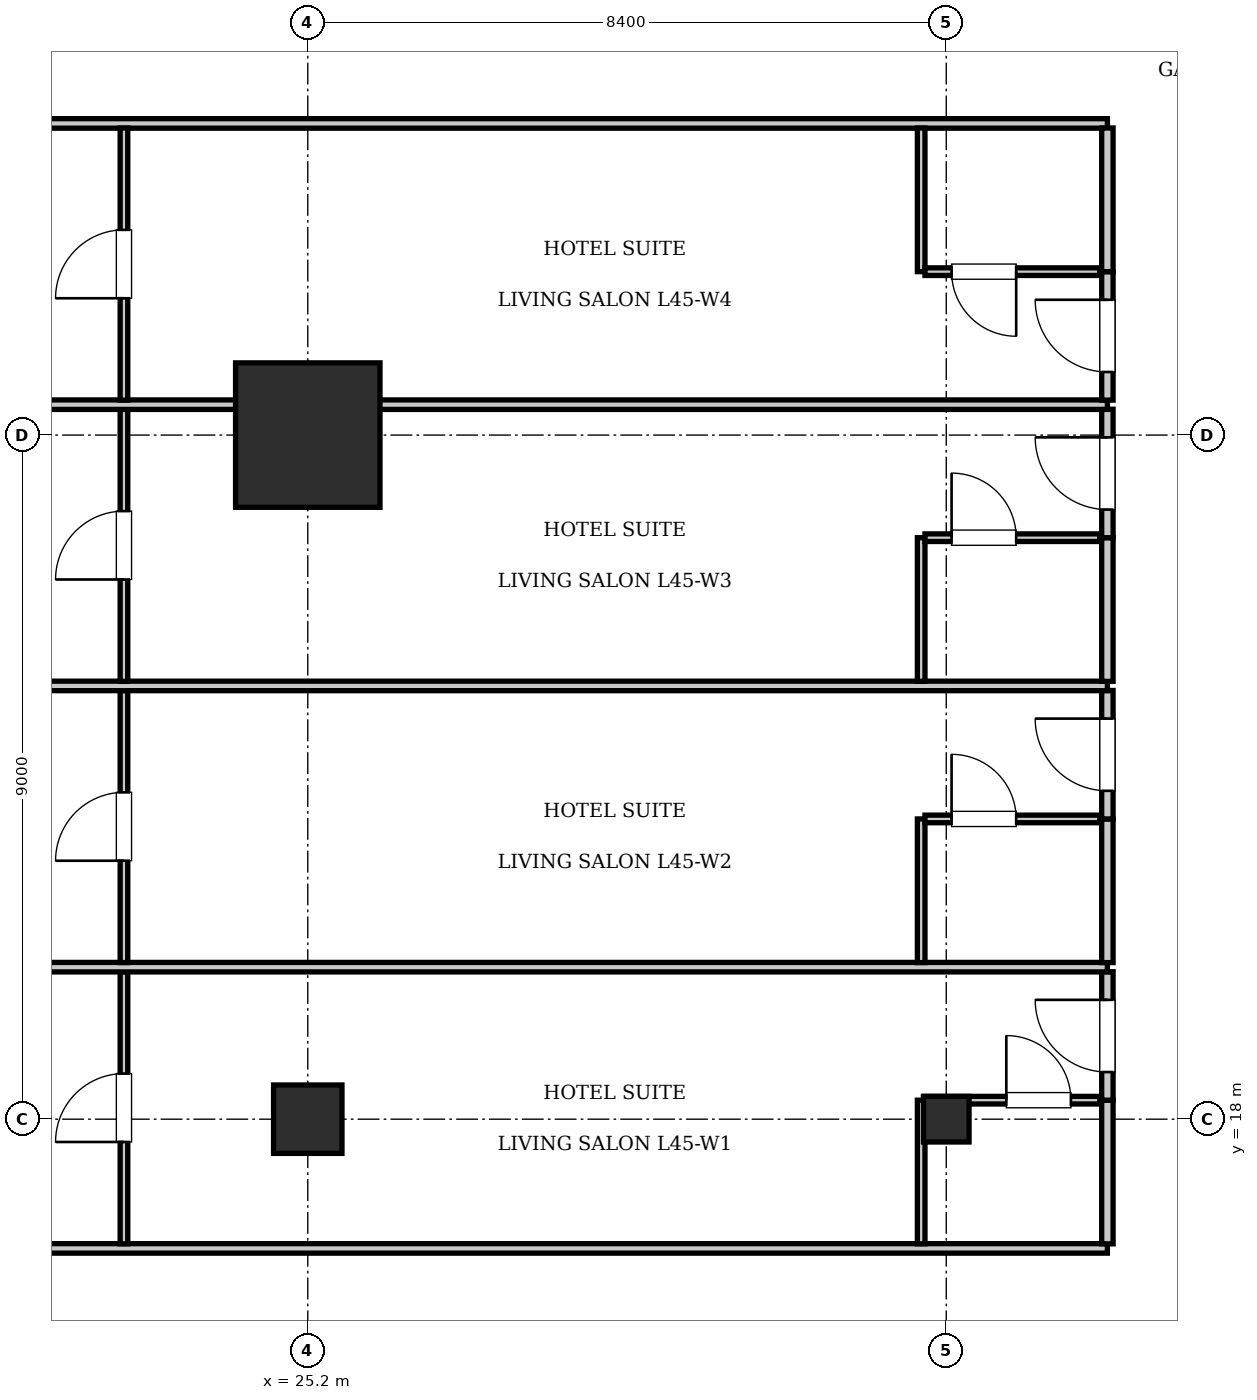
"""IFC4 building model, lengths in metres.
Left out: names, types, materials, properties, quantities, classifications, styles, units other than length and angle.
Written with IfcOpenShell. Run it as: python <this file> out.ifc"""

import sys

from ifc_helpers import new_model, si_unit, direction, frame, frame_2d, origin, origin_2d, place, context, subcontext, project, spatial, rectangle, i_section, extrude, element, fill, save


model = new_model("IFC4")
c1 = context("Model", 3, precision=1e-05, world=origin(), true_north=direction((0.0, 1.0)))
c2 = subcontext(c1, "Body", "Model", "MODEL_VIEW")
j1 = project(units=[si_unit("LENGTHUNIT", "METRE"), si_unit("PLANEANGLEUNIT", "RADIAN")], contexts=[c1])
p1 = place(None, origin())
s1 = spatial("IfcSite", under=j1, at=p1, CompositionType="ELEMENT")
p2 = place(p1, origin())
s2 = spatial("IfcBuilding", under=s1, at=p2, CompositionType="ELEMENT")
p3 = place(p2, frame((0.0, 0.0, 185.15)))
s3 = spatial("IfcBuildingStorey", under=s2, at=p3, CompositionType="ELEMENT", Elevation=185.15)
p4 = place(p3, frame((25.2, 27.0, 0.0), z_axis=(0.0, 0.0, 1.0), x_axis=(1.0, 0.0, 0.0)))
e1 = element("IfcColumn", 1, at=p4, inside=s3, PredefinedType="COLUMN", context=c2, shape_type="SweptSolid", body=[
    extrude(rectangle(XDim=1.9, YDim=1.9, at=origin_2d()), origin(), (0.0, 0.0, 1.0), 3.85),
])
p5 = place(p3, frame((25.2, 18.0, 0.0), z_axis=(0.0, 0.0, 1.0), x_axis=(1.0, 0.0, 0.0)))
e2 = element("IfcColumn", 2, at=p5, inside=s3, PredefinedType="COLUMN", context=c2, shape_type="SweptSolid", body=[
    extrude(rectangle(XDim=0.9, YDim=0.9, at=origin_2d()), origin(), (0.0, 0.0, 1.0), 3.85),
])
p6 = place(p3, frame((33.6, 18.0, 0.0), z_axis=(0.0, 0.0, 1.0), x_axis=(1.0, 0.0, 0.0)))
e3 = element("IfcColumn", 3, at=p6, inside=s3, PredefinedType="COLUMN", context=c2, shape_type="SweptSolid", body=[
    extrude(i_section(OverallWidth=0.6, OverallDepth=0.6, WebThickness=0.025, FlangeThickness=0.038, at=origin_2d()), origin(), (0.0, 0.0, 1.0), 3.85),
])
for number, where, z_axis, x_axis in (
    (4, (13.2, 16.3, 0.0), (0.0, 0.0, 1.0), (1.0, 0.0, 0.0)),
    (5, (13.2, 31.1, 0.0), (0.0, 0.0, 1.0), (1.0, 0.0, 0.0)),
):
    element("IfcWall", number, at=place(p3, frame(where, z_axis=z_axis, x_axis=x_axis)), inside=s3, PredefinedType="PARTITIONING", context=c2, shape_type="SweptSolid", body=[
        extrude(rectangle(XDim=22.52, YDim=0.125, at=frame_2d((11.26, 0.0))), origin(), (0.0, 0.0, 1.0), 3.61),
    ])
p7 = place(p3, frame((35.72, 16.36, 0.0), z_axis=(0.0, 0.0, 1.0), x_axis=(0.0, 1.0, 0.0)))
e6 = element("IfcWall", 6, at=p7, inside=s3, PredefinedType="PARTITIONING", context=c2, shape_type="SweptSolid", body=[
    extrude(rectangle(XDim=1.89, YDim=0.15, at=frame_2d((0.945, 0.0))), origin(), (0.0, 0.0, 1.0), 3.61),
])
p8 = place(p3, frame((35.72, 18.25, 0.0), z_axis=(0.0, 0.0, 1.0), x_axis=(0.0, 1.0, 0.0)))
e7 = element("IfcWall", 7, at=p8, inside=s3, PredefinedType="PARTITIONING", context=c2, shape_type="SweptSolid", body=[
    extrude(rectangle(XDim=1.69, YDim=0.15, at=frame_2d((0.845, 0.0))), origin(), (0.0, 0.0, 1.0), 3.61),
])
p9 = place(p8, frame((0.37, 0.0, 0.0)))
e8 = element("IfcOpeningElement", 8, at=p9, cuts=e7, PredefinedType="OPENING", context=c2, shape_type="SweptSolid", body=[
    extrude(rectangle(XDim=0.95, YDim=2.15, at=frame_2d((0.475, 1.075))), frame((0.0, 0.085, 0.0), z_axis=(0.0, -1.0, 0.0), x_axis=(1.0, 0.0, 0.0)), (0.0, 0.0, 1.0), 0.17),
])
p10 = place(p3, frame((33.27, 16.36, 0.0), z_axis=(0.0, 0.0, 1.0), x_axis=(0.0, 1.0, 0.0)))
e9 = element("IfcWall", 9, at=p10, inside=s3, PredefinedType="PARTITIONING", context=c2, shape_type="SweptSolid", body=[
    extrude(rectangle(XDim=1.89, YDim=0.1, at=frame_2d((0.945, 0.0))), origin(), (0.0, 0.0, 1.0), 3.61),
])
p11 = place(p3, frame((33.32, 18.25, 0.0), z_axis=(0.0, 0.0, 1.0), x_axis=(1.0, 0.0, 0.0)))
e10 = element("IfcWall", 10, at=p11, inside=s3, PredefinedType="PARTITIONING", context=c2, shape_type="SweptSolid", body=[
    extrude(rectangle(XDim=2.3, YDim=0.1, at=frame_2d((1.15, 0.0))), origin(), (0.0, 0.0, 1.0), 3.61),
])
p12 = place(p11, frame((1.07, 0.0, 0.0)))
e11 = element("IfcOpeningElement", 11, at=p12, cuts=e10, PredefinedType="OPENING", context=c2, shape_type="SweptSolid", body=[
    extrude(rectangle(XDim=0.85, YDim=2.1, at=frame_2d((0.425, 1.05))), frame((0.0, 0.06, 0.0), z_axis=(0.0, -1.0, 0.0), x_axis=(1.0, 0.0, 0.0)), (0.0, 0.0, 1.0), 0.12),
])
p13 = place(p3, frame((22.781, 16.36, 0.0), z_axis=(0.0, 0.0, 1.0), x_axis=(0.0, 1.0, 0.0)))
e12 = element("IfcWall", 12, at=p13, inside=s3, PredefinedType="PARTITIONING", context=c2, shape_type="SweptSolid", body=[
    extrude(rectangle(XDim=3.58, YDim=0.1, at=frame_2d((1.79, 0.0))), origin(), (0.0, 0.0, 1.0), 3.61),
])
p14 = place(p13, frame((1.34, 0.0, 0.0)))
e13 = element("IfcOpeningElement", 13, at=p14, cuts=e12, PredefinedType="OPENING", context=c2, shape_type="SweptSolid", body=[
    extrude(rectangle(XDim=0.9, YDim=2.1, at=frame_2d((0.45, 1.05))), frame((0.0, 0.06, 0.0), z_axis=(0.0, -1.0, 0.0), x_axis=(1.0, 0.0, 0.0)), (0.0, 0.0, 1.0), 0.12),
])
p15 = place(p3, frame((13.2, 20.0, 0.0), z_axis=(0.0, 0.0, 1.0), x_axis=(1.0, 0.0, 0.0)))
e14 = element("IfcWall", 14, at=p15, inside=s3, PredefinedType="PARTITIONING", context=c2, shape_type="SweptSolid", body=[
    extrude(rectangle(XDim=22.52, YDim=0.125, at=frame_2d((11.26, 0.0))), origin(), (0.0, 0.0, 1.0), 3.61),
])
p16 = place(p3, frame((35.72, 20.06, 0.0), z_axis=(0.0, 0.0, 1.0), x_axis=(0.0, 1.0, 0.0)))
e15 = element("IfcWall", 15, at=p16, inside=s3, PredefinedType="PARTITIONING", context=c2, shape_type="SweptSolid", body=[
    extrude(rectangle(XDim=1.89, YDim=0.15, at=frame_2d((0.945, 0.0))), origin(), (0.0, 0.0, 1.0), 3.61),
])
p17 = place(p3, frame((35.72, 21.95, 0.0), z_axis=(0.0, 0.0, 1.0), x_axis=(0.0, 1.0, 0.0)))
e16 = element("IfcWall", 16, at=p17, inside=s3, PredefinedType="PARTITIONING", context=c2, shape_type="SweptSolid", body=[
    extrude(rectangle(XDim=1.69, YDim=0.15, at=frame_2d((0.845, 0.0))), origin(), (0.0, 0.0, 1.0), 3.61),
])
p18 = place(p17, frame((0.37, 0.0, 0.0)))
e17 = element("IfcOpeningElement", 17, at=p18, cuts=e16, PredefinedType="OPENING", context=c2, shape_type="SweptSolid", body=[
    extrude(rectangle(XDim=0.95, YDim=2.15, at=frame_2d((0.475, 1.075))), frame((0.0, 0.085, 0.0), z_axis=(0.0, -1.0, 0.0), x_axis=(1.0, 0.0, 0.0)), (0.0, 0.0, 1.0), 0.17),
])
p19 = place(p3, frame((33.27, 20.06, 0.0), z_axis=(0.0, 0.0, 1.0), x_axis=(0.0, 1.0, 0.0)))
e18 = element("IfcWall", 18, at=p19, inside=s3, PredefinedType="PARTITIONING", context=c2, shape_type="SweptSolid", body=[
    extrude(rectangle(XDim=1.89, YDim=0.1, at=frame_2d((0.945, 0.0))), origin(), (0.0, 0.0, 1.0), 3.61),
])
p20 = place(p3, frame((33.32, 21.95, 0.0), z_axis=(0.0, 0.0, 1.0), x_axis=(1.0, 0.0, 0.0)))
e19 = element("IfcWall", 19, at=p20, inside=s3, PredefinedType="PARTITIONING", context=c2, shape_type="SweptSolid", body=[
    extrude(rectangle(XDim=2.3, YDim=0.1, at=frame_2d((1.15, 0.0))), origin(), (0.0, 0.0, 1.0), 3.61),
])
p21 = place(p20, frame((0.35, 0.0, 0.0)))
e20 = element("IfcOpeningElement", 20, at=p21, cuts=e19, PredefinedType="OPENING", context=c2, shape_type="SweptSolid", body=[
    extrude(rectangle(XDim=0.85, YDim=2.1, at=frame_2d((0.425, 1.05))), frame((0.0, 0.06, 0.0), z_axis=(0.0, -1.0, 0.0), x_axis=(1.0, 0.0, 0.0)), (0.0, 0.0, 1.0), 0.12),
])
p22 = place(p3, frame((22.781, 20.06, 0.0), z_axis=(0.0, 0.0, 1.0), x_axis=(0.0, 1.0, 0.0)))
e21 = element("IfcWall", 21, at=p22, inside=s3, PredefinedType="PARTITIONING", context=c2, shape_type="SweptSolid", body=[
    extrude(rectangle(XDim=3.58, YDim=0.1, at=frame_2d((1.79, 0.0))), origin(), (0.0, 0.0, 1.0), 3.61),
])
p23 = place(p22, frame((1.34, 0.0, 0.0)))
e22 = element("IfcOpeningElement", 22, at=p23, cuts=e21, PredefinedType="OPENING", context=c2, shape_type="SweptSolid", body=[
    extrude(rectangle(XDim=0.9, YDim=2.1, at=frame_2d((0.45, 1.05))), frame((0.0, 0.06, 0.0), z_axis=(0.0, -1.0, 0.0), x_axis=(1.0, 0.0, 0.0)), (0.0, 0.0, 1.0), 0.12),
])
p24 = place(p3, frame((13.2, 23.7, 0.0), z_axis=(0.0, 0.0, 1.0), x_axis=(1.0, 0.0, 0.0)))
e23 = element("IfcWall", 23, at=p24, inside=s3, PredefinedType="PARTITIONING", context=c2, shape_type="SweptSolid", body=[
    extrude(rectangle(XDim=22.52, YDim=0.125, at=frame_2d((11.26, 0.0))), origin(), (0.0, 0.0, 1.0), 3.61),
])
p25 = place(p3, frame((35.72, 23.76, 0.0), z_axis=(0.0, 0.0, 1.0), x_axis=(0.0, 1.0, 0.0)))
e24 = element("IfcWall", 24, at=p25, inside=s3, PredefinedType="PARTITIONING", context=c2, shape_type="SweptSolid", body=[
    extrude(rectangle(XDim=1.89, YDim=0.15, at=frame_2d((0.945, 0.0))), origin(), (0.0, 0.0, 1.0), 3.61),
])
p26 = place(p3, frame((35.72, 25.65, 0.0), z_axis=(0.0, 0.0, 1.0), x_axis=(0.0, 1.0, 0.0)))
e25 = element("IfcWall", 25, at=p26, inside=s3, PredefinedType="PARTITIONING", context=c2, shape_type="SweptSolid", body=[
    extrude(rectangle(XDim=1.69, YDim=0.15, at=frame_2d((0.845, 0.0))), origin(), (0.0, 0.0, 1.0), 3.61),
])
p27 = place(p26, frame((0.37, 0.0, 0.0)))
e26 = element("IfcOpeningElement", 26, at=p27, cuts=e25, PredefinedType="OPENING", context=c2, shape_type="SweptSolid", body=[
    extrude(rectangle(XDim=0.95, YDim=2.15, at=frame_2d((0.475, 1.075))), frame((0.0, 0.085, 0.0), z_axis=(0.0, -1.0, 0.0), x_axis=(1.0, 0.0, 0.0)), (0.0, 0.0, 1.0), 0.17),
])
p28 = place(p3, frame((33.27, 23.76, 0.0), z_axis=(0.0, 0.0, 1.0), x_axis=(0.0, 1.0, 0.0)))
e27 = element("IfcWall", 27, at=p28, inside=s3, PredefinedType="PARTITIONING", context=c2, shape_type="SweptSolid", body=[
    extrude(rectangle(XDim=1.89, YDim=0.1, at=frame_2d((0.945, 0.0))), origin(), (0.0, 0.0, 1.0), 3.61),
])
p29 = place(p3, frame((33.32, 25.65, 0.0), z_axis=(0.0, 0.0, 1.0), x_axis=(1.0, 0.0, 0.0)))
e28 = element("IfcWall", 28, at=p29, inside=s3, PredefinedType="PARTITIONING", context=c2, shape_type="SweptSolid", body=[
    extrude(rectangle(XDim=2.3, YDim=0.1, at=frame_2d((1.15, 0.0))), origin(), (0.0, 0.0, 1.0), 3.61),
])
p30 = place(p29, frame((0.35, 0.0, 0.0)))
e29 = element("IfcOpeningElement", 29, at=p30, cuts=e28, PredefinedType="OPENING", context=c2, shape_type="SweptSolid", body=[
    extrude(rectangle(XDim=0.85, YDim=2.1, at=frame_2d((0.425, 1.05))), frame((0.0, 0.06, 0.0), z_axis=(0.0, -1.0, 0.0), x_axis=(1.0, 0.0, 0.0)), (0.0, 0.0, 1.0), 0.12),
])
p31 = place(p3, frame((22.781, 23.76, 0.0), z_axis=(0.0, 0.0, 1.0), x_axis=(0.0, 1.0, 0.0)))
e30 = element("IfcWall", 30, at=p31, inside=s3, PredefinedType="PARTITIONING", context=c2, shape_type="SweptSolid", body=[
    extrude(rectangle(XDim=3.58, YDim=0.1, at=frame_2d((1.79, 0.0))), origin(), (0.0, 0.0, 1.0), 3.61),
])
p32 = place(p31, frame((1.34, 0.0, 0.0)))
e31 = element("IfcOpeningElement", 31, at=p32, cuts=e30, PredefinedType="OPENING", context=c2, shape_type="SweptSolid", body=[
    extrude(rectangle(XDim=0.9, YDim=2.1, at=frame_2d((0.45, 1.05))), frame((0.0, 0.06, 0.0), z_axis=(0.0, -1.0, 0.0), x_axis=(1.0, 0.0, 0.0)), (0.0, 0.0, 1.0), 0.12),
])
p33 = place(p3, frame((13.2, 27.4, 0.0), z_axis=(0.0, 0.0, 1.0), x_axis=(1.0, 0.0, 0.0)))
e32 = element("IfcWall", 32, at=p33, inside=s3, PredefinedType="PARTITIONING", context=c2, shape_type="SweptSolid", body=[
    extrude(rectangle(XDim=22.52, YDim=0.125, at=frame_2d((11.26, 0.0))), origin(), (0.0, 0.0, 1.0), 3.61),
])
p34 = place(p3, frame((35.72, 27.46, 0.0), z_axis=(0.0, 0.0, 1.0), x_axis=(0.0, 1.0, 0.0)))
e33 = element("IfcWall", 33, at=p34, inside=s3, PredefinedType="PARTITIONING", context=c2, shape_type="SweptSolid", body=[
    extrude(rectangle(XDim=1.69, YDim=0.15, at=frame_2d((0.845, 0.0))), origin(), (0.0, 0.0, 1.0), 3.61),
])
p35 = place(p34, frame((0.37, 0.0, 0.0)))
e34 = element("IfcOpeningElement", 34, at=p35, cuts=e33, PredefinedType="OPENING", context=c2, shape_type="SweptSolid", body=[
    extrude(rectangle(XDim=0.95, YDim=2.15, at=frame_2d((0.475, 1.075))), frame((0.0, 0.085, 0.0), z_axis=(0.0, -1.0, 0.0), x_axis=(1.0, 0.0, 0.0)), (0.0, 0.0, 1.0), 0.17),
])
p36 = place(p3, frame((35.72, 29.15, 0.0), z_axis=(0.0, 0.0, 1.0), x_axis=(0.0, 1.0, 0.0)))
e35 = element("IfcWall", 35, at=p36, inside=s3, PredefinedType="PARTITIONING", context=c2, shape_type="SweptSolid", body=[
    extrude(rectangle(XDim=1.89, YDim=0.15, at=frame_2d((0.945, 0.0))), origin(), (0.0, 0.0, 1.0), 3.61),
])
p37 = place(p3, frame((33.27, 29.15, 0.0), z_axis=(0.0, 0.0, 1.0), x_axis=(0.0, 1.0, 0.0)))
e36 = element("IfcWall", 36, at=p37, inside=s3, PredefinedType="PARTITIONING", context=c2, shape_type="SweptSolid", body=[
    extrude(rectangle(XDim=1.89, YDim=0.1, at=frame_2d((0.945, 0.0))), origin(), (0.0, 0.0, 1.0), 3.61),
])
p38 = place(p3, frame((33.32, 29.15, 0.0), z_axis=(0.0, 0.0, 1.0), x_axis=(1.0, 0.0, 0.0)))
e37 = element("IfcWall", 37, at=p38, inside=s3, PredefinedType="PARTITIONING", context=c2, shape_type="SweptSolid", body=[
    extrude(rectangle(XDim=2.3, YDim=0.1, at=frame_2d((1.15, 0.0))), origin(), (0.0, 0.0, 1.0), 3.61),
])
p39 = place(p38, frame((0.35, 0.0, 0.0)))
e38 = element("IfcOpeningElement", 38, at=p39, cuts=e37, PredefinedType="OPENING", context=c2, shape_type="SweptSolid", body=[
    extrude(rectangle(XDim=0.85, YDim=2.1, at=frame_2d((0.425, 1.05))), frame((0.0, 0.06, 0.0), z_axis=(0.0, -1.0, 0.0), x_axis=(1.0, 0.0, 0.0)), (0.0, 0.0, 1.0), 0.12),
])
p40 = place(p3, frame((22.781, 27.46, 0.0), z_axis=(0.0, 0.0, 1.0), x_axis=(0.0, 1.0, 0.0)))
e39 = element("IfcWall", 39, at=p40, inside=s3, PredefinedType="PARTITIONING", context=c2, shape_type="SweptSolid", body=[
    extrude(rectangle(XDim=3.58, YDim=0.1, at=frame_2d((1.79, 0.0))), origin(), (0.0, 0.0, 1.0), 3.61),
])
p41 = place(p40, frame((1.34, 0.0, 0.0)))
e40 = element("IfcOpeningElement", 40, at=p41, cuts=e39, PredefinedType="OPENING", context=c2, shape_type="SweptSolid", body=[
    extrude(rectangle(XDim=0.9, YDim=2.1, at=frame_2d((0.45, 1.05))), frame((0.0, 0.06, 0.0), z_axis=(0.0, -1.0, 0.0), x_axis=(1.0, 0.0, 0.0)), (0.0, 0.0, 1.0), 0.12),
])
p42 = place(p12, origin())
e41 = element("IfcDoor", 41, at=p42, inside=s3, OperationType="SINGLE_SWING_LEFT", PredefinedType="DOOR", context=c2, shape_type="SweptSolid", body=[
    extrude(rectangle(XDim=0.85, YDim=2.1, at=frame_2d((0.425, 1.05))), frame((0.0, 0.025, 0.0), z_axis=(0.0, -1.0, 0.0), x_axis=(1.0, 0.0, 0.0)), (0.0, 0.0, 1.0), 0.05),
])
fill(e11, e41)
p43 = place(p9, origin())
e42 = element("IfcDoor", 42, at=p43, inside=s3, OperationType="SINGLE_SWING_RIGHT", PredefinedType="DOOR", context=c2, shape_type="SweptSolid", body=[
    extrude(rectangle(XDim=0.95, YDim=2.15, at=frame_2d((0.475, 1.075))), frame((0.0, 0.025, 0.0), z_axis=(0.0, -1.0, 0.0), x_axis=(1.0, 0.0, 0.0)), (0.0, 0.0, 1.0), 0.05),
])
fill(e8, e42)
p44 = place(p14, origin())
e43 = element("IfcDoor", 43, at=p44, inside=s3, OperationType="SINGLE_SWING_LEFT", PredefinedType="DOOR", context=c2, shape_type="SweptSolid", body=[
    extrude(rectangle(XDim=0.9, YDim=2.1, at=frame_2d((0.45, 1.05))), frame((0.0, 0.025, 0.0), z_axis=(0.0, -1.0, 0.0), x_axis=(1.0, 0.0, 0.0)), (0.0, 0.0, 1.0), 0.05),
])
fill(e13, e43)
p45 = place(p21, origin())
e44 = element("IfcDoor", 44, at=p45, inside=s3, OperationType="SINGLE_SWING_LEFT", PredefinedType="DOOR", context=c2, shape_type="SweptSolid", body=[
    extrude(rectangle(XDim=0.85, YDim=2.1, at=frame_2d((0.425, 1.05))), frame((0.0, 0.025, 0.0), z_axis=(0.0, -1.0, 0.0), x_axis=(1.0, 0.0, 0.0)), (0.0, 0.0, 1.0), 0.05),
])
fill(e20, e44)
p46 = place(p18, origin())
e45 = element("IfcDoor", 45, at=p46, inside=s3, OperationType="SINGLE_SWING_RIGHT", PredefinedType="DOOR", context=c2, shape_type="SweptSolid", body=[
    extrude(rectangle(XDim=0.95, YDim=2.15, at=frame_2d((0.475, 1.075))), frame((0.0, 0.025, 0.0), z_axis=(0.0, -1.0, 0.0), x_axis=(1.0, 0.0, 0.0)), (0.0, 0.0, 1.0), 0.05),
])
fill(e17, e45)
p47 = place(p23, origin())
e46 = element("IfcDoor", 46, at=p47, inside=s3, OperationType="SINGLE_SWING_LEFT", PredefinedType="DOOR", context=c2, shape_type="SweptSolid", body=[
    extrude(rectangle(XDim=0.9, YDim=2.1, at=frame_2d((0.45, 1.05))), frame((0.0, 0.025, 0.0), z_axis=(0.0, -1.0, 0.0), x_axis=(1.0, 0.0, 0.0)), (0.0, 0.0, 1.0), 0.05),
])
fill(e22, e46)
p48 = place(p30, origin())
e47 = element("IfcDoor", 47, at=p48, inside=s3, OperationType="SINGLE_SWING_LEFT", PredefinedType="DOOR", context=c2, shape_type="SweptSolid", body=[
    extrude(rectangle(XDim=0.85, YDim=2.1, at=frame_2d((0.425, 1.05))), frame((0.0, 0.025, 0.0), z_axis=(0.0, -1.0, 0.0), x_axis=(1.0, 0.0, 0.0)), (0.0, 0.0, 1.0), 0.05),
])
fill(e29, e47)
p49 = place(p27, origin())
e48 = element("IfcDoor", 48, at=p49, inside=s3, OperationType="SINGLE_SWING_RIGHT", PredefinedType="DOOR", context=c2, shape_type="SweptSolid", body=[
    extrude(rectangle(XDim=0.95, YDim=2.15, at=frame_2d((0.475, 1.075))), frame((0.0, 0.025, 0.0), z_axis=(0.0, -1.0, 0.0), x_axis=(1.0, 0.0, 0.0)), (0.0, 0.0, 1.0), 0.05),
])
fill(e26, e48)
p50 = place(p32, origin())
e49 = element("IfcDoor", 49, at=p50, inside=s3, OperationType="SINGLE_SWING_LEFT", PredefinedType="DOOR", context=c2, shape_type="SweptSolid", body=[
    extrude(rectangle(XDim=0.9, YDim=2.1, at=frame_2d((0.45, 1.05))), frame((0.0, 0.025, 0.0), z_axis=(0.0, -1.0, 0.0), x_axis=(1.0, 0.0, 0.0)), (0.0, 0.0, 1.0), 0.05),
])
fill(e31, e49)
p51 = place(p39, frame((0.85, 0.0, 0.0), z_axis=(0.0, 0.0, 1.0), x_axis=(-1.0, 0.0, 0.0)))
e50 = element("IfcDoor", 50, at=p51, inside=s3, OperationType="SINGLE_SWING_LEFT", PredefinedType="DOOR", context=c2, shape_type="SweptSolid", body=[
    extrude(rectangle(XDim=0.85, YDim=2.1, at=frame_2d((0.425, 1.05))), frame((0.0, 0.025, 0.0), z_axis=(0.0, -1.0, 0.0), x_axis=(1.0, 0.0, 0.0)), (0.0, 0.0, 1.0), 0.05),
])
fill(e38, e50)
p52 = place(p35, origin())
e51 = element("IfcDoor", 51, at=p52, inside=s3, OperationType="SINGLE_SWING_RIGHT", PredefinedType="DOOR", context=c2, shape_type="SweptSolid", body=[
    extrude(rectangle(XDim=0.95, YDim=2.15, at=frame_2d((0.475, 1.075))), frame((0.0, 0.025, 0.0), z_axis=(0.0, -1.0, 0.0), x_axis=(1.0, 0.0, 0.0)), (0.0, 0.0, 1.0), 0.05),
])
fill(e34, e51)
p53 = place(p41, origin())
e52 = element("IfcDoor", 52, at=p53, inside=s3, OperationType="SINGLE_SWING_LEFT", PredefinedType="DOOR", context=c2, shape_type="SweptSolid", body=[
    extrude(rectangle(XDim=0.9, YDim=2.1, at=frame_2d((0.45, 1.05))), frame((0.0, 0.025, 0.0), z_axis=(0.0, -1.0, 0.0), x_axis=(1.0, 0.0, 0.0)), (0.0, 0.0, 1.0), 0.05),
])
fill(e40, e52)
save(model, sys.argv[1])
